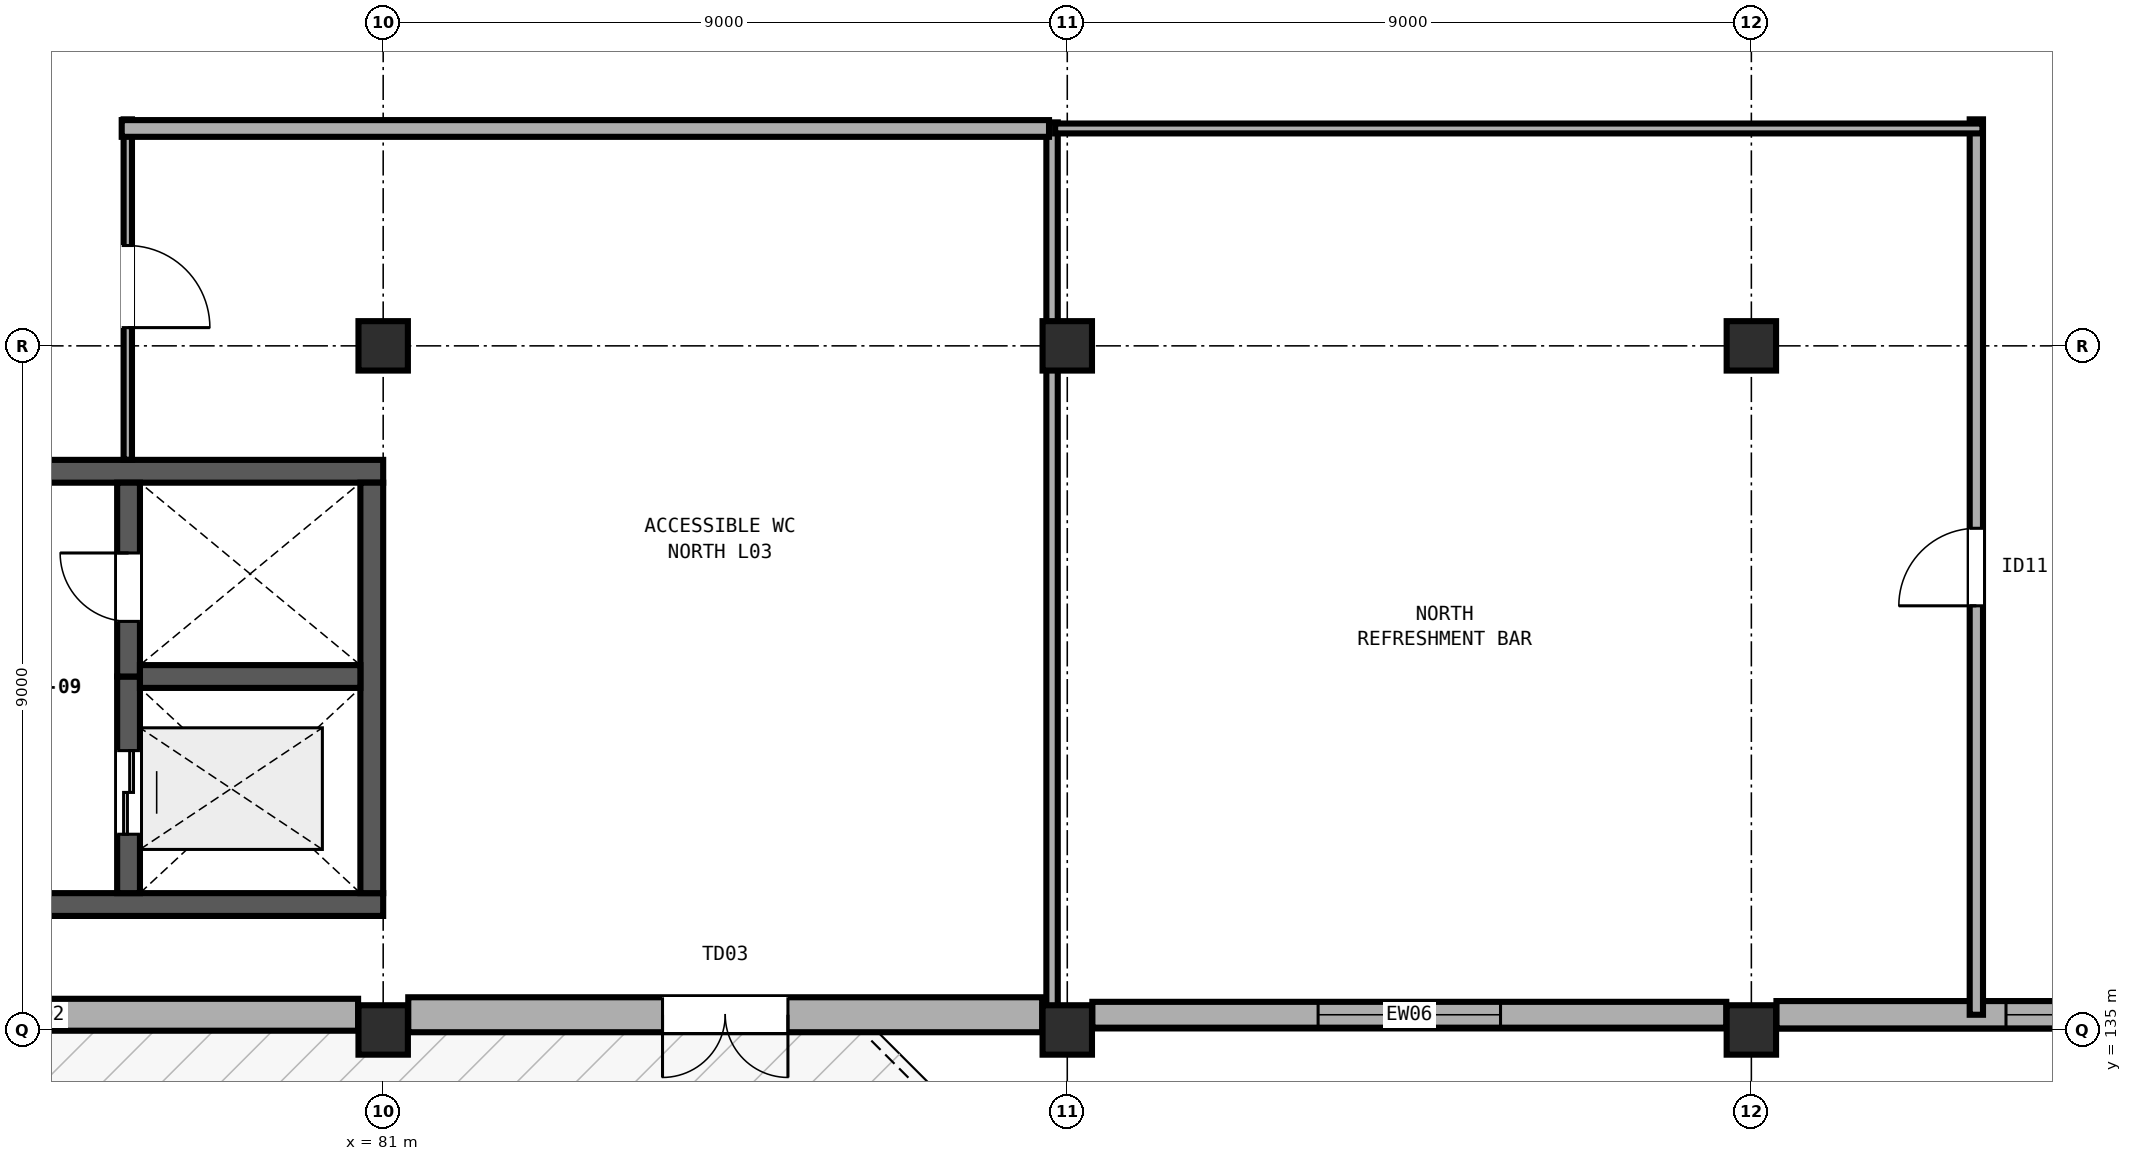
"""IFC4 building model, lengths in metres.
Left out: names, types, materials, properties, quantities, classifications, styles, units other than length and angle.
Written with IfcOpenShell. Run it as: python <this file> out.ifc"""

import sys

from ifc_helpers import new_model, si_unit, direction, frame, frame_2d, origin, origin_2d, place, context, subcontext, project, spatial, rectangle, extrude, element, fill, save


model = new_model("IFC4")
c1 = context("Model", 3, precision=1e-05, world=origin(), true_north=direction((0.0, 1.0)))
c2 = subcontext(c1, "Body", "Model", "MODEL_VIEW")
j1 = project(units=[si_unit("LENGTHUNIT", "METRE"), si_unit("PLANEANGLEUNIT", "RADIAN")], contexts=[c1])
p1 = place(None, origin())
s1 = spatial("IfcSite", under=j1, at=p1, CompositionType="ELEMENT")
p2 = place(p1, origin())
s2 = spatial("IfcBuilding", under=s1, at=p2, CompositionType="ELEMENT")
p3 = place(p2, frame((0.0, 0.0, 14.4)))
s3 = spatial("IfcBuildingStorey", under=s2, at=p3, CompositionType="ELEMENT", Elevation=14.4)
for number, where, z_axis, x_axis in (
    (1, (81.0, 135.0, 0.0), (0.0, 0.0, 1.0), (1.0, 0.0, 0.0)),
    (2, (81.0, 144.0, 0.0), (0.0, 0.0, 1.0), (1.0, 0.0, 0.0)),
    (3, (90.0, 135.0, 0.0), (0.0, 0.0, 1.0), (1.0, 0.0, 0.0)),
    (4, (90.0, 144.0, 0.0), (0.0, 0.0, 1.0), (1.0, 0.0, 0.0)),
    (5, (99.0, 135.0, 0.0), (0.0, 0.0, 1.0), (1.0, 0.0, 0.0)),
    (6, (99.0, 144.0, 0.0), (0.0, 0.0, 1.0), (1.0, 0.0, 0.0)),
):
    element("IfcColumn", number, at=place(p3, frame(where, z_axis=z_axis, x_axis=x_axis)), inside=s3, PredefinedType="COLUMN", context=c2, shape_type="SweptSolid", body=[
        extrude(rectangle(XDim=0.65, YDim=0.65, at=origin_2d()), origin(), (0.0, 0.0, 1.0), 4.8),
    ])
p4 = place(p3, frame((63.0, 136.65, 0.0), z_axis=(0.0, 0.0, 1.0), x_axis=(1.0, 0.0, 0.0)))
e7 = element("IfcWall", 7, at=p4, inside=s3, PredefinedType="SHEAR", context=c2, shape_type="SweptSolid", body=[
    extrude(rectangle(XDim=18.0, YDim=0.3, at=frame_2d((9.0, 0.0))), origin(), (0.0, 0.0, 1.0), 4.555),
])
p5 = place(p3, frame((81.0, 142.35, 0.0), z_axis=(0.0, 0.0, 1.0), x_axis=(-1.0, 0.0, 0.0)))
e8 = element("IfcWall", 8, at=p5, inside=s3, PredefinedType="SHEAR", context=c2, shape_type="SweptSolid", body=[
    extrude(rectangle(XDim=18.0, YDim=0.3, at=frame_2d((9.0, 0.0))), origin(), (0.0, 0.0, 1.0), 4.555),
])
p6 = place(p5, frame((4.7, 0.0, 0.0)))
e9 = element("IfcOpeningElement", 9, at=p6, cuts=e8, PredefinedType="OPENING", context=c2, shape_type="SweptSolid", body=[
    extrude(rectangle(XDim=1.9, YDim=2.25, at=frame_2d((0.95, 1.125))), frame((0.0, 0.16, 0.0), z_axis=(0.0, -1.0, 0.0), x_axis=(1.0, 0.0, 0.0)), (0.0, 0.0, 1.0), 0.32),
])
p7 = place(p3, frame((80.85, 136.8, 0.0), z_axis=(0.0, 0.0, 1.0), x_axis=(0.0, 1.0, 0.0)))
e10 = element("IfcWall", 10, at=p7, inside=s3, PredefinedType="SHEAR", context=c2, shape_type="SweptSolid", body=[
    extrude(rectangle(XDim=5.4, YDim=0.3, at=frame_2d((2.7, 0.0))), origin(), (0.0, 0.0, 1.0), 4.555),
])
p8 = place(p3, frame((77.65, 136.8, 0.0), z_axis=(0.0, 0.0, 1.0), x_axis=(0.0, 1.0, 0.0)))
e11 = element("IfcWall", 11, at=p8, inside=s3, PredefinedType="SHEAR", context=c2, shape_type="SweptSolid", body=[
    extrude(rectangle(XDim=2.85, YDim=0.3, at=frame_2d((1.425, 0.0))), origin(), (0.0, 0.0, 1.0), 4.555),
])
p9 = place(p8, frame((0.775, 0.0, 0.0)))
e12 = element("IfcOpeningElement", 12, at=p9, cuts=e11, PredefinedType="OPENING", context=c2, shape_type="SweptSolid", body=[
    extrude(rectangle(XDim=1.1, YDim=2.1, at=frame_2d((0.55, 1.05))), frame((0.0, 0.16, 0.0), z_axis=(0.0, -1.0, 0.0), x_axis=(1.0, 0.0, 0.0)), (0.0, 0.0, 1.0), 0.32),
])
p10 = place(p3, frame((77.65, 139.65, 0.0), z_axis=(0.0, 0.0, 1.0), x_axis=(0.0, 1.0, 0.0)))
e13 = element("IfcWall", 13, at=p10, inside=s3, PredefinedType="SHEAR", context=c2, shape_type="SweptSolid", body=[
    extrude(rectangle(XDim=2.55, YDim=0.3, at=frame_2d((1.275, 0.0))), origin(), (0.0, 0.0, 1.0), 4.555),
])
p11 = place(p10, frame((0.725, 0.0, 0.0)))
e14 = element("IfcOpeningElement", 14, at=p11, cuts=e13, PredefinedType="OPENING", context=c2, shape_type="SweptSolid", body=[
    extrude(rectangle(XDim=0.9, YDim=2.1, at=frame_2d((0.45, 1.05))), frame((0.0, 0.16, 0.0), z_axis=(0.0, -1.0, 0.0), x_axis=(1.0, 0.0, 0.0)), (0.0, 0.0, 1.0), 0.32),
])
p12 = place(p3, frame((77.8, 139.65, 0.0), z_axis=(0.0, 0.0, 1.0), x_axis=(1.0, 0.0, 0.0)))
e15 = element("IfcWall", 15, at=p12, inside=s3, PredefinedType="SHEAR", context=c2, shape_type="SweptSolid", body=[
    extrude(rectangle(XDim=2.9, YDim=0.3, at=frame_2d((1.45, 0.0))), origin(), (0.0, 0.0, 1.0), 4.555),
])
p13 = place(p3, frame((107.67, 135.2, 0.0), z_axis=(0.0, 0.0, 1.0), x_axis=(-1.0, 0.0, 0.0)))
e16 = element("IfcWall", 16, at=p13, inside=s3, PredefinedType="SOLIDWALL", context=c2, shape_type="SweptSolid", body=[
    extrude(rectangle(XDim=8.34, YDim=0.36, at=frame_2d((4.17, 0.0))), origin(), (0.0, 0.0, 1.0), 3.58),
])
p14 = place(p13, frame((3.02, 0.0, 0.9)))
e17 = element("IfcOpeningElement", 17, at=p14, cuts=e16, PredefinedType="OPENING", context=c2, shape_type="SweptSolid", body=[
    extrude(rectangle(XDim=2.3, YDim=2.0, at=frame_2d((1.15, 1.0))), frame((0.0, 0.19, 0.0), z_axis=(0.0, -1.0, 0.0), x_axis=(1.0, 0.0, 0.0)), (0.0, 0.0, 1.0), 0.38),
])
p15 = place(p3, frame((98.67, 135.2, 0.0), z_axis=(0.0, 0.0, 1.0), x_axis=(-1.0, 0.0, 0.0)))
e18 = element("IfcWall", 18, at=p15, inside=s3, PredefinedType="SOLIDWALL", context=c2, shape_type="SweptSolid", body=[
    extrude(rectangle(XDim=8.34, YDim=0.34, at=frame_2d((4.17, 0.0))), origin(), (0.0, 0.0, 1.0), 3.58),
])
p16 = place(p15, frame((2.97, 0.0, 0.9)))
e19 = element("IfcOpeningElement", 19, at=p16, cuts=e18, PredefinedType="OPENING", context=c2, shape_type="SweptSolid", body=[
    extrude(rectangle(XDim=2.4, YDim=2.05, at=frame_2d((1.2, 1.025))), frame((0.0, 0.18, 0.0), z_axis=(0.0, -1.0, 0.0), x_axis=(1.0, 0.0, 0.0)), (0.0, 0.0, 1.0), 0.36),
])
p17 = place(p3, frame((89.67, 135.2, 0.0), z_axis=(0.0, 0.0, 1.0), x_axis=(-1.0, 0.0, 0.0)))
e20 = element("IfcWall", 20, at=p17, inside=s3, PredefinedType="SOLIDWALL", context=c2, shape_type="SweptSolid", body=[
    extrude(rectangle(XDim=8.34, YDim=0.46, at=frame_2d((4.17, 0.0))), origin(), (0.0, 0.0, 1.0), 3.58),
])
p18 = place(p17, frame((3.345, 0.0, 0.0)))
e21 = element("IfcOpeningElement", 21, at=p18, cuts=e20, PredefinedType="OPENING", context=c2, shape_type="SweptSolid", body=[
    extrude(rectangle(XDim=1.65, YDim=2.2, at=frame_2d((0.825, 1.1))), frame((0.0, 0.24, 0.0), z_axis=(0.0, -1.0, 0.0), x_axis=(1.0, 0.0, 0.0)), (0.0, 0.0, 1.0), 0.48),
])
p19 = place(p3, frame((80.67, 135.2, 0.0), z_axis=(0.0, 0.0, 1.0), x_axis=(-1.0, 0.0, 0.0)))
e22 = element("IfcWall", 22, at=p19, inside=s3, PredefinedType="SOLIDWALL", context=c2, shape_type="SweptSolid", body=[
    extrude(rectangle(XDim=8.34, YDim=0.42, at=frame_2d((4.17, 0.0))), origin(), (0.0, 0.0, 1.0), 3.58),
])
p20 = place(p3, frame((101.96, 135.2, 0.0), z_axis=(0.0, 0.0, 1.0), x_axis=(0.0, 1.0, 0.0)))
e23 = element("IfcWall", 23, at=p20, inside=s3, PredefinedType="PARTITIONING", context=c2, shape_type="SweptSolid", body=[
    extrude(rectangle(XDim=11.78, YDim=0.175, at=frame_2d((5.89, 0.0))), origin(), (0.0, 0.0, 1.0), 3.56),
])
p21 = place(p20, frame((5.38, 0.0, 0.0)))
e24 = element("IfcOpeningElement", 24, at=p21, cuts=e23, PredefinedType="OPENING", context=c2, shape_type="SweptSolid", body=[
    extrude(rectangle(XDim=1.02, YDim=2.16, at=frame_2d((0.51, 1.08))), frame((0.0, 0.097, 0.0), z_axis=(0.0, -1.0, 0.0), x_axis=(1.0, 0.0, 0.0)), (0.0, 0.0, 1.0), 0.195),
])
p22 = place(p3, frame((89.8, 135.24, 0.0), z_axis=(0.0, 0.0, 1.0), x_axis=(0.0, 1.0, 0.0)))
e25 = element("IfcWall", 25, at=p22, inside=s3, PredefinedType="PARTITIONING", context=c2, shape_type="SweptSolid", body=[
    extrude(rectangle(XDim=11.7, YDim=0.15, at=frame_2d((5.85, 0.0))), origin(), (0.0, 0.0, 1.0), 3.56),
])
p23 = place(p3, frame((89.84, 146.86, 0.0), z_axis=(0.0, 0.0, 1.0), x_axis=(1.0, 0.0, 0.0)))
e26 = element("IfcWall", 26, at=p23, inside=s3, PredefinedType="PARTITIONING", context=c2, shape_type="SweptSolid", body=[
    extrude(rectangle(XDim=12.2, YDim=0.13, at=frame_2d((6.1, 0.0))), origin(), (0.0, 0.0, 1.0), 3.56),
])
p24 = place(p3, frame((77.64, 146.98, 0.0), z_axis=(0.0, 0.0, 1.0), x_axis=(0.0, -1.0, 0.0)))
e27 = element("IfcWall", 27, at=p24, inside=s3, PredefinedType="PARTITIONING", context=c2, shape_type="SweptSolid", body=[
    extrude(rectangle(XDim=4.478, YDim=0.11, at=frame_2d((2.239, 0.0))), origin(), (0.0, 0.0, 1.0), 3.56),
])
p25 = place(p24, frame((1.66, 0.0, 0.0)))
e28 = element("IfcOpeningElement", 28, at=p25, cuts=e27, PredefinedType="OPENING", context=c2, shape_type="SweptSolid", body=[
    extrude(rectangle(XDim=1.08, YDim=2.18, at=frame_2d((0.54, 1.09))), frame((0.0, 0.065, 0.0), z_axis=(0.0, -1.0, 0.0), x_axis=(1.0, 0.0, 0.0)), (0.0, 0.0, 1.0), 0.13),
])
p26 = place(p3, frame((77.56, 146.86, 0.0), z_axis=(0.0, 0.0, 1.0), x_axis=(1.0, 0.0, 0.0)))
e29 = element("IfcWall", 29, at=p26, inside=s3, PredefinedType="PARTITIONING", context=c2, shape_type="SweptSolid", body=[
    extrude(rectangle(XDim=12.2, YDim=0.22, at=frame_2d((6.1, 0.0))), origin(), (0.0, 0.0, 1.0), 3.56),
])
p27 = place(p14, origin())
e30 = element("IfcWindow", 30, at=p27, inside=s3, PartitioningType="DOUBLE_PANEL_VERTICAL", PredefinedType="WINDOW", context=c2, shape_type="SweptSolid", body=[
    extrude(rectangle(XDim=2.3, YDim=2.0, at=frame_2d((1.15, 1.0))), frame((0.0, 0.03, 0.0), z_axis=(0.0, -1.0, 0.0), x_axis=(1.0, 0.0, 0.0)), (0.0, 0.0, 1.0), 0.06),
])
fill(e17, e30)
p28 = place(p16, origin())
e31 = element("IfcWindow", 31, at=p28, inside=s3, PartitioningType="DOUBLE_PANEL_VERTICAL", PredefinedType="WINDOW", context=c2, shape_type="SweptSolid", body=[
    extrude(rectangle(XDim=2.4, YDim=2.05, at=frame_2d((1.2, 1.025))), frame((0.0, 0.03, 0.0), z_axis=(0.0, -1.0, 0.0), x_axis=(1.0, 0.0, 0.0)), (0.0, 0.0, 1.0), 0.06),
])
fill(e19, e31)
p29 = place(p18, origin())
e32 = element("IfcDoor", 32, at=p29, inside=s3, OperationType="DOUBLE_DOOR_SINGLE_SWING", PredefinedType="DOOR", context=c2, shape_type="SweptSolid", body=[
    extrude(rectangle(XDim=1.65, YDim=2.2, at=frame_2d((0.825, 1.1))), frame((0.0, 0.025, 0.0), z_axis=(0.0, -1.0, 0.0), x_axis=(1.0, 0.0, 0.0)), (0.0, 0.0, 1.0), 0.05),
])
fill(e21, e32)
p30 = place(p11, origin())
e33 = element("IfcDoor", 33, at=p30, inside=s3, OperationType="SINGLE_SWING_RIGHT", PredefinedType="DOOR", context=c2, shape_type="SweptSolid", body=[
    extrude(rectangle(XDim=0.9, YDim=2.1, at=frame_2d((0.45, 1.05))), frame((0.0, 0.025, 0.0), z_axis=(0.0, -1.0, 0.0), x_axis=(1.0, 0.0, 0.0)), (0.0, 0.0, 1.0), 0.05),
])
fill(e14, e33)
p31 = place(p9, origin())
e34 = element("IfcDoor", 34, at=p31, inside=s3, OperationType="DOUBLE_DOOR_SLIDING", PredefinedType="DOOR", context=c2, shape_type="SweptSolid", body=[
    extrude(rectangle(XDim=1.1, YDim=2.1, at=frame_2d((0.55, 1.05))), frame((0.0, 0.025, 0.0), z_axis=(0.0, -1.0, 0.0), x_axis=(1.0, 0.0, 0.0)), (0.0, 0.0, 1.0), 0.05),
])
fill(e12, e34)
p32 = place(p21, origin())
e35 = element("IfcDoor", 35, at=p32, inside=s3, OperationType="SINGLE_SWING_LEFT", PredefinedType="DOOR", context=c2, shape_type="SweptSolid", body=[
    extrude(rectangle(XDim=1.02, YDim=2.16, at=frame_2d((0.51, 1.08))), frame((0.0, 0.025, 0.0), z_axis=(0.0, -1.0, 0.0), x_axis=(1.0, 0.0, 0.0)), (0.0, 0.0, 1.0), 0.05),
])
fill(e24, e35)
p33 = place(p25, origin())
e36 = element("IfcDoor", 36, at=p33, inside=s3, OperationType="SINGLE_SWING_RIGHT", PredefinedType="DOOR", context=c2, shape_type="SweptSolid", body=[
    extrude(rectangle(XDim=1.08, YDim=2.18, at=frame_2d((0.54, 1.09))), frame((0.0, 0.025, 0.0), z_axis=(0.0, -1.0, 0.0), x_axis=(1.0, 0.0, 0.0)), (0.0, 0.0, 1.0), 0.05),
])
fill(e28, e36)
save(model, sys.argv[1])
